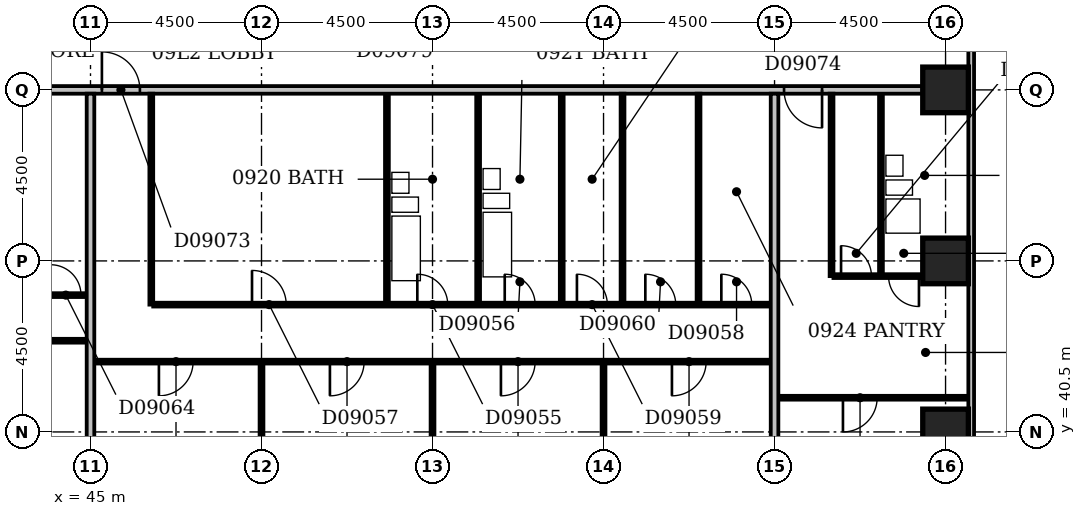
"""IFC4 building model, lengths in metres.
Left out: names, types, materials, properties, quantities, classifications, styles, units other than length and angle.
Written with IfcOpenShell. Run it as: python <this file> out.ifc"""

import sys

from ifc_helpers import new_model, si_unit, direction, frame, frame_2d, origin, origin_2d, place, context, subcontext, project, spatial, rectangle, extrude, element, fill, save


model = new_model("IFC4")
c1 = context("Model", 3, precision=1e-05, world=origin(), true_north=direction((0.0, 1.0)))
c2 = subcontext(c1, "Body", "Model", "MODEL_VIEW")
j1 = project(units=[si_unit("LENGTHUNIT", "METRE"), si_unit("PLANEANGLEUNIT", "RADIAN")], contexts=[c1])
p1 = place(None, origin())
s1 = spatial("IfcSite", under=j1, at=p1, CompositionType="ELEMENT")
p2 = place(p1, origin())
s2 = spatial("IfcBuilding", under=s1, at=p2, CompositionType="ELEMENT")
p3 = place(p2, frame((0.0, 0.0, 43.4)))
s3 = spatial("IfcBuildingStorey", under=s2, at=p3, CompositionType="ELEMENT", Elevation=43.4)
for number, where, z_axis, x_axis in (
    (1, (67.5, 40.5, -0.3), (0.0, 0.0, 1.0), (1.0, 0.0, 0.0)),
    (2, (67.5, 45.0, -0.3), (0.0, 0.0, 1.0), (1.0, 0.0, 0.0)),
    (3, (67.5, 49.5, -0.3), (0.0, 0.0, 1.0), (1.0, 0.0, 0.0)),
):
    element("IfcColumn", number, at=place(p3, frame(where, z_axis=z_axis, x_axis=x_axis)), inside=s3, PredefinedType="COLUMN", context=c2, shape_type="SweptSolid", body=[
        extrude(rectangle(XDim=1.2, YDim=1.2, at=origin_2d()), origin(), (0.0, 0.0, 1.0), 3.6),
    ])
p4 = place(p3, frame((68.175, 35.4, 0.0), z_axis=(0.0, 0.0, 1.0), x_axis=(0.0, 1.0, 0.0)))
e4 = element("IfcWall", 4, at=p4, inside=s3, PredefinedType="STANDARD", context=c2, shape_type="SweptSolid", body=[
    extrude(rectangle(XDim=23.85, YDim=0.15, at=frame_2d((11.925, 0.0))), origin(), (0.0, 0.0, 1.0), 2.7),
])
p5 = place(p4, frame((1.523, 0.0, 0.6)))
e5 = element("IfcOpeningElement", 5, at=p5, cuts=e4, PredefinedType="OPENING", context=c2, shape_type="SweptSolid", body=[
    extrude(rectangle(XDim=1.2, YDim=1.8, at=frame_2d((0.6, 0.9))), frame((0.0, 0.087, 0.0), z_axis=(0.0, -1.0, 0.0), x_axis=(1.0, 0.0, 0.0)), (0.0, 0.0, 1.0), 0.174),
])
p6 = place(p4, frame((19.5, 0.0, 0.6)))
e6 = element("IfcOpeningElement", 6, at=p6, cuts=e4, PredefinedType="OPENING", context=c2, shape_type="SweptSolid", body=[
    extrude(rectangle(XDim=0.6, YDim=1.8, at=frame_2d((0.3, 0.9))), frame((0.0, 0.087, 0.0), z_axis=(0.0, -1.0, 0.0), x_axis=(1.0, 0.0, 0.0)), (0.0, 0.0, 1.0), 0.174),
])
p7 = place(p4, frame((21.78, 0.0, 0.6)))
e7 = element("IfcOpeningElement", 7, at=p7, cuts=e4, PredefinedType="OPENING", context=c2, shape_type="SweptSolid", body=[
    extrude(rectangle(XDim=0.45, YDim=1.8, at=frame_2d((0.225, 0.9))), frame((0.0, 0.087, 0.0), z_axis=(0.0, -1.0, 0.0), x_axis=(1.0, 0.0, 0.0)), (0.0, 0.0, 1.0), 0.174),
])
p8 = place(p3, frame((45.0, 36.6, 0.0), z_axis=(0.0, 0.0, 1.0), x_axis=(0.0, 1.0, 0.0)))
e8 = element("IfcWall", 8, at=p8, inside=s3, PredefinedType="PARTITIONING", context=c2, shape_type="SweptSolid", body=[
    extrude(rectangle(XDim=12.8, YDim=0.2, at=frame_2d((6.4, 0.0))), origin(), (0.0, 0.0, 1.0), 2.6),
])
p9 = place(p3, frame((49.5, 36.6, 0.0), z_axis=(0.0, 0.0, 1.0), x_axis=(0.0, 1.0, 0.0)))
e9 = element("IfcWall", 9, at=p9, inside=s3, PredefinedType="PARTITIONING", context=c2, shape_type="SweptSolid", body=[
    extrude(rectangle(XDim=5.7, YDim=0.1, at=frame_2d((2.85, 0.0))), origin(), (0.0, 0.0, 1.0), 3.3),
])
p10 = place(p3, frame((54.0, 36.6, 0.0), z_axis=(0.0, 0.0, 1.0), x_axis=(0.0, 1.0, 0.0)))
e10 = element("IfcWall", 10, at=p10, inside=s3, PredefinedType="PARTITIONING", context=c2, shape_type="SweptSolid", body=[
    extrude(rectangle(XDim=5.7, YDim=0.1, at=frame_2d((2.85, 0.0))), origin(), (0.0, 0.0, 1.0), 2.6),
])
p11 = place(p3, frame((58.5, 36.6, 0.0), z_axis=(0.0, 0.0, 1.0), x_axis=(0.0, 1.0, 0.0)))
e11 = element("IfcWall", 11, at=p11, inside=s3, PredefinedType="PARTITIONING", context=c2, shape_type="SweptSolid", body=[
    extrude(rectangle(XDim=5.7, YDim=0.1, at=frame_2d((2.85, 0.0))), origin(), (0.0, 0.0, 1.0), 3.3),
])
p12 = place(p3, frame((63.0, 36.6, 0.0), z_axis=(0.0, 0.0, 1.0), x_axis=(0.0, 1.0, 0.0)))
e12 = element("IfcWall", 12, at=p12, inside=s3, PredefinedType="PARTITIONING", context=c2, shape_type="SweptSolid", body=[
    extrude(rectangle(XDim=12.8, YDim=0.2, at=frame_2d((6.4, 0.0))), origin(), (0.0, 0.0, 1.0), 2.4),
])
p13 = place(p3, frame((63.1, 41.4, 0.0), z_axis=(0.0, 0.0, 1.0), x_axis=(1.0, 0.0, 0.0)))
e13 = element("IfcWall", 13, at=p13, inside=s3, PredefinedType="PARTITIONING", context=c2, shape_type="SweptSolid", body=[
    extrude(rectangle(XDim=5.0, YDim=0.1, at=frame_2d((2.5, 0.0))), origin(), (0.0, 0.0, 1.0), 3.3),
])
p14 = place(p13, frame((1.7, 0.0, 0.0)))
e14 = element("IfcOpeningElement", 14, at=p14, cuts=e13, PredefinedType="OPENING", context=c2, shape_type="SweptSolid", body=[
    extrude(rectangle(XDim=0.9, YDim=2.1, at=frame_2d((0.45, 1.05))), frame((0.0, 0.062, 0.0), z_axis=(0.0, -1.0, 0.0), x_axis=(1.0, 0.0, 0.0)), (0.0, 0.0, 1.0), 0.124),
])
p15 = place(p3, frame((45.1, 42.35, 0.0), z_axis=(0.0, 0.0, 1.0), x_axis=(1.0, 0.0, 0.0)))
e15 = element("IfcWall", 15, at=p15, inside=s3, PredefinedType="PARTITIONING", context=c2, shape_type="SweptSolid", body=[
    extrude(rectangle(XDim=17.8, YDim=0.1, at=frame_2d((8.9, 0.0))), origin(), (0.0, 0.0, 1.0), 3.3),
])
p16 = place(p15, frame((1.7, 0.0, 0.0)))
e16 = element("IfcOpeningElement", 16, at=p16, cuts=e15, PredefinedType="OPENING", context=c2, shape_type="SweptSolid", body=[
    extrude(rectangle(XDim=0.9, YDim=2.1, at=frame_2d((0.45, 1.05))), frame((0.0, 0.062, 0.0), z_axis=(0.0, -1.0, 0.0), x_axis=(1.0, 0.0, 0.0)), (0.0, 0.0, 1.0), 0.124),
])
p17 = place(p15, frame((6.2, 0.0, 0.0)))
e17 = element("IfcOpeningElement", 17, at=p17, cuts=e15, PredefinedType="OPENING", context=c2, shape_type="SweptSolid", body=[
    extrude(rectangle(XDim=0.9, YDim=2.1, at=frame_2d((0.45, 1.05))), frame((0.0, 0.062, 0.0), z_axis=(0.0, -1.0, 0.0), x_axis=(1.0, 0.0, 0.0)), (0.0, 0.0, 1.0), 0.124),
])
p18 = place(p15, frame((10.7, 0.0, 0.0)))
e18 = element("IfcOpeningElement", 18, at=p18, cuts=e15, PredefinedType="OPENING", context=c2, shape_type="SweptSolid", body=[
    extrude(rectangle(XDim=0.9, YDim=2.1, at=frame_2d((0.45, 1.05))), frame((0.0, 0.062, 0.0), z_axis=(0.0, -1.0, 0.0), x_axis=(1.0, 0.0, 0.0)), (0.0, 0.0, 1.0), 0.124),
])
p19 = place(p15, frame((15.2, 0.0, 0.0)))
e19 = element("IfcOpeningElement", 19, at=p19, cuts=e15, PredefinedType="OPENING", context=c2, shape_type="SweptSolid", body=[
    extrude(rectangle(XDim=0.9, YDim=2.1, at=frame_2d((0.45, 1.05))), frame((0.0, 0.062, 0.0), z_axis=(0.0, -1.0, 0.0), x_axis=(1.0, 0.0, 0.0)), (0.0, 0.0, 1.0), 0.124),
])
p20 = place(p3, frame((40.6, 42.9, 0.0), z_axis=(0.0, 0.0, 1.0), x_axis=(1.0, 0.0, 0.0)))
e20 = element("IfcWall", 20, at=p20, inside=s3, PredefinedType="PARTITIONING", context=c2, shape_type="SweptSolid", body=[
    extrude(rectangle(XDim=4.3, YDim=0.1, at=frame_2d((2.15, 0.0))), origin(), (0.0, 0.0, 1.0), 3.3),
])
p21 = place(p20, frame((1.7, 0.0, 0.0)))
e21 = element("IfcOpeningElement", 21, at=p21, cuts=e20, PredefinedType="OPENING", context=c2, shape_type="SweptSolid", body=[
    extrude(rectangle(XDim=0.9, YDim=2.1, at=frame_2d((0.45, 1.05))), frame((0.0, 0.062, 0.0), z_axis=(0.0, -1.0, 0.0), x_axis=(1.0, 0.0, 0.0)), (0.0, 0.0, 1.0), 0.124),
])
p22 = place(p3, frame((46.6, 43.85, 0.0), z_axis=(0.0, 0.0, 1.0), x_axis=(0.0, 1.0, 0.0)))
e22 = element("IfcWall", 22, at=p22, inside=s3, PredefinedType="PARTITIONING", context=c2, shape_type="SweptSolid", body=[
    extrude(rectangle(XDim=5.55, YDim=0.1, at=frame_2d((2.775, 0.0))), origin(), (0.0, 0.0, 1.0), 3.3),
])
p23 = place(p3, frame((46.65, 43.85, 0.0), z_axis=(0.0, 0.0, 1.0), x_axis=(1.0, 0.0, 0.0)))
e23 = element("IfcWall", 23, at=p23, inside=s3, PredefinedType="PARTITIONING", context=c2, shape_type="SweptSolid", body=[
    extrude(rectangle(XDim=16.25, YDim=0.1, at=frame_2d((8.125, 0.0))), origin(), (0.0, 0.0, 1.0), 3.3),
])
p24 = place(p23, frame((6.95, 0.0, 0.0)))
e24 = element("IfcOpeningElement", 24, at=p24, cuts=e23, PredefinedType="OPENING", context=c2, shape_type="SweptSolid", body=[
    extrude(rectangle(XDim=0.8, YDim=2.1, at=frame_2d((0.4, 1.05))), frame((0.0, 0.062, 0.0), z_axis=(0.0, -1.0, 0.0), x_axis=(1.0, 0.0, 0.0)), (0.0, 0.0, 1.0), 0.124),
])
p25 = place(p23, frame((9.25, 0.0, 0.0)))
e25 = element("IfcOpeningElement", 25, at=p25, cuts=e23, PredefinedType="OPENING", context=c2, shape_type="SweptSolid", body=[
    extrude(rectangle(XDim=0.8, YDim=2.1, at=frame_2d((0.4, 1.05))), frame((0.0, 0.062, 0.0), z_axis=(0.0, -1.0, 0.0), x_axis=(1.0, 0.0, 0.0)), (0.0, 0.0, 1.0), 0.124),
])
p26 = place(p23, frame((2.6, 0.0, 0.0)))
e26 = element("IfcOpeningElement", 26, at=p26, cuts=e23, PredefinedType="OPENING", context=c2, shape_type="SweptSolid", body=[
    extrude(rectangle(XDim=0.9, YDim=2.1, at=frame_2d((0.45, 1.05))), frame((0.0, 0.062, 0.0), z_axis=(0.0, -1.0, 0.0), x_axis=(1.0, 0.0, 0.0)), (0.0, 0.0, 1.0), 0.124),
])
p27 = place(p23, frame((14.95, 0.0, 0.0)))
e27 = element("IfcOpeningElement", 27, at=p27, cuts=e23, PredefinedType="OPENING", context=c2, shape_type="SweptSolid", body=[
    extrude(rectangle(XDim=0.8, YDim=2.1, at=frame_2d((0.4, 1.05))), frame((0.0, 0.062, 0.0), z_axis=(0.0, -1.0, 0.0), x_axis=(1.0, 0.0, 0.0)), (0.0, 0.0, 1.0), 0.124),
])
p28 = place(p23, frame((11.15, 0.0, 0.0)))
e28 = element("IfcOpeningElement", 28, at=p28, cuts=e23, PredefinedType="OPENING", context=c2, shape_type="SweptSolid", body=[
    extrude(rectangle(XDim=0.8, YDim=2.1, at=frame_2d((0.4, 1.05))), frame((0.0, 0.062, 0.0), z_axis=(0.0, -1.0, 0.0), x_axis=(1.0, 0.0, 0.0)), (0.0, 0.0, 1.0), 0.124),
])
p29 = place(p23, frame((12.95, 0.0, 0.0)))
e29 = element("IfcOpeningElement", 29, at=p29, cuts=e23, PredefinedType="OPENING", context=c2, shape_type="SweptSolid", body=[
    extrude(rectangle(XDim=0.8, YDim=2.1, at=frame_2d((0.4, 1.05))), frame((0.0, 0.062, 0.0), z_axis=(0.0, -1.0, 0.0), x_axis=(1.0, 0.0, 0.0)), (0.0, 0.0, 1.0), 0.124),
])
for number, where, z_axis, x_axis in (
    (30, (52.8, 43.9, 0.0), (0.0, 0.0, 1.0), (0.0, 1.0, 0.0)),
    (31, (55.2, 43.9, 0.0), (0.0, 0.0, 1.0), (0.0, 1.0, 0.0)),
    (32, (57.4, 43.9, 0.0), (0.0, 0.0, 1.0), (0.0, 1.0, 0.0)),
):
    element("IfcWall", number, at=place(p3, frame(where, z_axis=z_axis, x_axis=x_axis)), inside=s3, PredefinedType="PLUMBINGWALL", context=c2, shape_type="SweptSolid", body=[
        extrude(rectangle(XDim=5.5, YDim=0.1, at=frame_2d((2.75, 0.0))), origin(), (0.0, 0.0, 1.0), 3.3),
    ])
for number, where, z_axis, x_axis in (
    (33, (59.0, 43.9, 0.0), (0.0, 0.0, 1.0), (0.0, 1.0, 0.0)),
    (34, (61.0, 43.9, 0.0), (0.0, 0.0, 1.0), (0.0, 1.0, 0.0)),
):
    element("IfcWall", number, at=place(p3, frame(where, z_axis=z_axis, x_axis=x_axis)), inside=s3, PredefinedType="PARTITIONING", context=c2, shape_type="SweptSolid", body=[
        extrude(rectangle(XDim=5.5, YDim=0.1, at=frame_2d((2.75, 0.0))), origin(), (0.0, 0.0, 1.0), 3.3),
    ])
p30 = place(p3, frame((43.75, 44.1, 0.0), z_axis=(0.0, 0.0, 1.0), x_axis=(1.0, 0.0, 0.0)))
e35 = element("IfcWall", 35, at=p30, inside=s3, PredefinedType="PARTITIONING", context=c2, shape_type="SweptSolid", body=[
    extrude(rectangle(XDim=1.15, YDim=0.1, at=frame_2d((0.575, 0.0))), origin(), (0.0, 0.0, 1.0), 3.3),
])
p31 = place(p30, frame((0.2, 0.0, 0.0)))
e36 = element("IfcOpeningElement", 36, at=p31, cuts=e35, PredefinedType="OPENING", context=c2, shape_type="SweptSolid", body=[
    extrude(rectangle(XDim=0.8, YDim=2.1, at=frame_2d((0.4, 1.05))), frame((0.0, 0.062, 0.0), z_axis=(0.0, -1.0, 0.0), x_axis=(1.0, 0.0, 0.0)), (0.0, 0.0, 1.0), 0.124),
])
p32 = place(p3, frame((64.5, 44.6, 0.0), z_axis=(0.0, 0.0, 1.0), x_axis=(0.0, 1.0, 0.0)))
e37 = element("IfcWall", 37, at=p32, inside=s3, PredefinedType="PARTITIONING", context=c2, shape_type="SweptSolid", body=[
    extrude(rectangle(XDim=4.8, YDim=0.1, at=frame_2d((2.4, 0.0))), origin(), (0.0, 0.0, 1.0), 3.3),
])
p33 = place(p3, frame((64.55, 44.6, 0.0), z_axis=(0.0, 0.0, 1.0), x_axis=(1.0, 0.0, 0.0)))
e38 = element("IfcWall", 38, at=p33, inside=s3, PredefinedType="PARTITIONING", context=c2, shape_type="SweptSolid", body=[
    extrude(rectangle(XDim=2.35, YDim=0.1, at=frame_2d((1.175, 0.0))), origin(), (0.0, 0.0, 1.0), 3.3),
])
p34 = place(p33, frame((1.45, 0.0, 0.0)))
e39 = element("IfcOpeningElement", 39, at=p34, cuts=e38, PredefinedType="OPENING", context=c2, shape_type="SweptSolid", body=[
    extrude(rectangle(XDim=0.8, YDim=2.1, at=frame_2d((0.4, 1.05))), frame((0.0, 0.062, 0.0), z_axis=(0.0, -1.0, 0.0), x_axis=(1.0, 0.0, 0.0)), (0.0, 0.0, 1.0), 0.124),
])
p35 = place(p33, frame((0.2, 0.0, 0.0)))
e40 = element("IfcOpeningElement", 40, at=p35, cuts=e38, PredefinedType="OPENING", context=c2, shape_type="SweptSolid", body=[
    extrude(rectangle(XDim=0.8, YDim=2.1, at=frame_2d((0.4, 1.05))), frame((0.0, 0.062, 0.0), z_axis=(0.0, -1.0, 0.0), x_axis=(1.0, 0.0, 0.0)), (0.0, 0.0, 1.0), 0.124),
])
p36 = place(p3, frame((65.8, 44.65, 0.0), z_axis=(0.0, 0.0, 1.0), x_axis=(0.0, 1.0, 0.0)))
e41 = element("IfcWall", 41, at=p36, inside=s3, PredefinedType="PLUMBINGWALL", context=c2, shape_type="SweptSolid", body=[
    extrude(rectangle(XDim=4.75, YDim=0.1, at=frame_2d((2.375, 0.0))), origin(), (0.0, 0.0, 1.0), 3.3),
])
p37 = place(p3, frame((9.1, 49.5, 0.0), z_axis=(0.0, 0.0, 1.0), x_axis=(1.0, 0.0, 0.0)))
e42 = element("IfcWall", 42, at=p37, inside=s3, PredefinedType="PARTITIONING", context=c2, shape_type="SweptSolid", body=[
    extrude(rectangle(XDim=57.8, YDim=0.2, at=frame_2d((28.9, 0.0))), origin(), (0.0, 0.0, 1.0), 3.3),
])
p38 = place(p37, frame((14.95, 0.0, 0.0)))
e43 = element("IfcOpeningElement", 43, at=p38, cuts=e42, PredefinedType="OPENING", context=c2, shape_type="SweptSolid", body=[
    extrude(rectangle(XDim=1.0, YDim=2.1, at=frame_2d((0.5, 1.05))), frame((0.0, 0.112, 0.0), z_axis=(0.0, -1.0, 0.0), x_axis=(1.0, 0.0, 0.0)), (0.0, 0.0, 1.0), 0.224),
])
p39 = place(p37, frame((19.85, 0.0, 0.0)))
e44 = element("IfcOpeningElement", 44, at=p39, cuts=e42, PredefinedType="OPENING", context=c2, shape_type="SweptSolid", body=[
    extrude(rectangle(XDim=1.0, YDim=2.1, at=frame_2d((0.5, 1.05))), frame((0.0, 0.112, 0.0), z_axis=(0.0, -1.0, 0.0), x_axis=(1.0, 0.0, 0.0)), (0.0, 0.0, 1.0), 0.224),
])
p40 = place(p37, frame((22.7, 0.0, 0.0)))
e45 = element("IfcOpeningElement", 45, at=p40, cuts=e42, PredefinedType="OPENING", context=c2, shape_type="SweptSolid", body=[
    extrude(rectangle(XDim=1.0, YDim=2.1, at=frame_2d((0.5, 1.05))), frame((0.0, 0.112, 0.0), z_axis=(0.0, -1.0, 0.0), x_axis=(1.0, 0.0, 0.0)), (0.0, 0.0, 1.0), 0.224),
])
p41 = place(p37, frame((33.35, 0.0, 0.0)))
e46 = element("IfcOpeningElement", 46, at=p41, cuts=e42, PredefinedType="OPENING", context=c2, shape_type="SweptSolid", body=[
    extrude(rectangle(XDim=1.0, YDim=2.1, at=frame_2d((0.5, 1.05))), frame((0.0, 0.112, 0.0), z_axis=(0.0, -1.0, 0.0), x_axis=(1.0, 0.0, 0.0)), (0.0, 0.0, 1.0), 0.224),
])
p42 = place(p37, frame((36.2, 0.0, 0.0)))
e47 = element("IfcOpeningElement", 47, at=p42, cuts=e42, PredefinedType="OPENING", context=c2, shape_type="SweptSolid", body=[
    extrude(rectangle(XDim=1.0, YDim=2.1, at=frame_2d((0.5, 1.05))), frame((0.0, 0.112, 0.0), z_axis=(0.0, -1.0, 0.0), x_axis=(1.0, 0.0, 0.0)), (0.0, 0.0, 1.0), 0.224),
])
p43 = place(p37, frame((54.15, 0.0, 0.0)))
e48 = element("IfcOpeningElement", 48, at=p43, cuts=e42, PredefinedType="OPENING", context=c2, shape_type="SweptSolid", body=[
    extrude(rectangle(XDim=1.0, YDim=2.1, at=frame_2d((0.5, 1.05))), frame((0.0, 0.112, 0.0), z_axis=(0.0, -1.0, 0.0), x_axis=(1.0, 0.0, 0.0)), (0.0, 0.0, 1.0), 0.224),
])
p44 = place(p37, frame((6.15, 0.0, 0.0)))
e49 = element("IfcOpeningElement", 49, at=p44, cuts=e42, PredefinedType="OPENING", context=c2, shape_type="SweptSolid", body=[
    extrude(rectangle(XDim=0.9, YDim=2.1, at=frame_2d((0.45, 1.05))), frame((0.0, 0.112, 0.0), z_axis=(0.0, -1.0, 0.0), x_axis=(1.0, 0.0, 0.0)), (0.0, 0.0, 1.0), 0.224),
])
p45 = place(p14, frame((0.9, 0.0, 0.0), z_axis=(0.0, 0.0, 1.0), x_axis=(-1.0, 0.0, 0.0)))
e50 = element("IfcDoor", 50, at=p45, inside=s3, OperationType="SINGLE_SWING_RIGHT", PredefinedType="DOOR", context=c2, shape_type="SweptSolid", body=[
    extrude(rectangle(XDim=0.9, YDim=2.1, at=frame_2d((0.45, 1.05))), frame((0.0, 0.025, 0.0), z_axis=(0.0, -1.0, 0.0), x_axis=(1.0, 0.0, 0.0)), (0.0, 0.0, 1.0), 0.05),
])
fill(e14, e50)
p46 = place(p16, frame((0.9, 0.0, 0.0), z_axis=(0.0, 0.0, 1.0), x_axis=(-1.0, 0.0, 0.0)))
e51 = element("IfcDoor", 51, at=p46, inside=s3, OperationType="SINGLE_SWING_RIGHT", PredefinedType="DOOR", context=c2, shape_type="SweptSolid", body=[
    extrude(rectangle(XDim=0.9, YDim=2.1, at=frame_2d((0.45, 1.05))), frame((0.0, 0.025, 0.0), z_axis=(0.0, -1.0, 0.0), x_axis=(1.0, 0.0, 0.0)), (0.0, 0.0, 1.0), 0.05),
])
fill(e16, e51)
p47 = place(p17, frame((0.9, 0.0, 0.0), z_axis=(0.0, 0.0, 1.0), x_axis=(-1.0, 0.0, 0.0)))
e52 = element("IfcDoor", 52, at=p47, inside=s3, OperationType="SINGLE_SWING_RIGHT", PredefinedType="DOOR", context=c2, shape_type="SweptSolid", body=[
    extrude(rectangle(XDim=0.9, YDim=2.1, at=frame_2d((0.45, 1.05))), frame((0.0, 0.025, 0.0), z_axis=(0.0, -1.0, 0.0), x_axis=(1.0, 0.0, 0.0)), (0.0, 0.0, 1.0), 0.05),
])
fill(e17, e52)
p48 = place(p18, frame((0.9, 0.0, 0.0), z_axis=(0.0, 0.0, 1.0), x_axis=(-1.0, 0.0, 0.0)))
e53 = element("IfcDoor", 53, at=p48, inside=s3, OperationType="SINGLE_SWING_RIGHT", PredefinedType="DOOR", context=c2, shape_type="SweptSolid", body=[
    extrude(rectangle(XDim=0.9, YDim=2.1, at=frame_2d((0.45, 1.05))), frame((0.0, 0.025, 0.0), z_axis=(0.0, -1.0, 0.0), x_axis=(1.0, 0.0, 0.0)), (0.0, 0.0, 1.0), 0.05),
])
fill(e18, e53)
p49 = place(p19, frame((0.9, 0.0, 0.0), z_axis=(0.0, 0.0, 1.0), x_axis=(-1.0, 0.0, 0.0)))
e54 = element("IfcDoor", 54, at=p49, inside=s3, OperationType="SINGLE_SWING_RIGHT", PredefinedType="DOOR", context=c2, shape_type="SweptSolid", body=[
    extrude(rectangle(XDim=0.9, YDim=2.1, at=frame_2d((0.45, 1.05))), frame((0.0, 0.025, 0.0), z_axis=(0.0, -1.0, 0.0), x_axis=(1.0, 0.0, 0.0)), (0.0, 0.0, 1.0), 0.05),
])
fill(e19, e54)
p50 = place(p24, origin())
e55 = element("IfcDoor", 55, at=p50, inside=s3, OperationType="SINGLE_SWING_LEFT", PredefinedType="DOOR", context=c2, shape_type="SweptSolid", body=[
    extrude(rectangle(XDim=0.8, YDim=2.1, at=frame_2d((0.4, 1.05))), frame((0.0, 0.025, 0.0), z_axis=(0.0, -1.0, 0.0), x_axis=(1.0, 0.0, 0.0)), (0.0, 0.0, 1.0), 0.05),
])
fill(e24, e55)
p51 = place(p25, origin())
e56 = element("IfcDoor", 56, at=p51, inside=s3, OperationType="SINGLE_SWING_LEFT", PredefinedType="DOOR", context=c2, shape_type="SweptSolid", body=[
    extrude(rectangle(XDim=0.8, YDim=2.1, at=frame_2d((0.4, 1.05))), frame((0.0, 0.025, 0.0), z_axis=(0.0, -1.0, 0.0), x_axis=(1.0, 0.0, 0.0)), (0.0, 0.0, 1.0), 0.05),
])
fill(e25, e56)
p52 = place(p26, origin())
e57 = element("IfcDoor", 57, at=p52, inside=s3, OperationType="SINGLE_SWING_LEFT", PredefinedType="DOOR", context=c2, shape_type="SweptSolid", body=[
    extrude(rectangle(XDim=0.9, YDim=2.1, at=frame_2d((0.45, 1.05))), frame((0.0, 0.025, 0.0), z_axis=(0.0, -1.0, 0.0), x_axis=(1.0, 0.0, 0.0)), (0.0, 0.0, 1.0), 0.05),
])
fill(e26, e57)
p53 = place(p27, origin())
e58 = element("IfcDoor", 58, at=p53, inside=s3, OperationType="SINGLE_SWING_LEFT", PredefinedType="DOOR", context=c2, shape_type="SweptSolid", body=[
    extrude(rectangle(XDim=0.8, YDim=2.1, at=frame_2d((0.4, 1.05))), frame((0.0, 0.025, 0.0), z_axis=(0.0, -1.0, 0.0), x_axis=(1.0, 0.0, 0.0)), (0.0, 0.0, 1.0), 0.05),
])
fill(e27, e58)
p54 = place(p28, origin())
e59 = element("IfcDoor", 59, at=p54, inside=s3, OperationType="SINGLE_SWING_LEFT", PredefinedType="DOOR", context=c2, shape_type="SweptSolid", body=[
    extrude(rectangle(XDim=0.8, YDim=2.1, at=frame_2d((0.4, 1.05))), frame((0.0, 0.025, 0.0), z_axis=(0.0, -1.0, 0.0), x_axis=(1.0, 0.0, 0.0)), (0.0, 0.0, 1.0), 0.05),
])
fill(e28, e59)
p55 = place(p29, origin())
e60 = element("IfcDoor", 60, at=p55, inside=s3, OperationType="SINGLE_SWING_LEFT", PredefinedType="DOOR", context=c2, shape_type="SweptSolid", body=[
    extrude(rectangle(XDim=0.8, YDim=2.1, at=frame_2d((0.4, 1.05))), frame((0.0, 0.025, 0.0), z_axis=(0.0, -1.0, 0.0), x_axis=(1.0, 0.0, 0.0)), (0.0, 0.0, 1.0), 0.05),
])
fill(e29, e60)
p56 = place(p31, origin())
e61 = element("IfcDoor", 61, at=p56, inside=s3, OperationType="SINGLE_SWING_LEFT", PredefinedType="DOOR", context=c2, shape_type="SweptSolid", body=[
    extrude(rectangle(XDim=0.8, YDim=2.1, at=frame_2d((0.4, 1.05))), frame((0.0, 0.025, 0.0), z_axis=(0.0, -1.0, 0.0), x_axis=(1.0, 0.0, 0.0)), (0.0, 0.0, 1.0), 0.05),
])
fill(e36, e61)
p57 = place(p34, origin())
e62 = element("IfcDoor", 62, at=p57, inside=s3, OperationType="SINGLE_SWING_RIGHT", PredefinedType="DOOR", context=c2, shape_type="SweptSolid", body=[
    extrude(rectangle(XDim=0.8, YDim=2.1, at=frame_2d((0.4, 1.05))), frame((0.0, 0.025, 0.0), z_axis=(0.0, -1.0, 0.0), x_axis=(1.0, 0.0, 0.0)), (0.0, 0.0, 1.0), 0.05),
])
fill(e39, e62)
p58 = place(p35, origin())
e63 = element("IfcDoor", 63, at=p58, inside=s3, OperationType="SINGLE_SWING_LEFT", PredefinedType="DOOR", context=c2, shape_type="SweptSolid", body=[
    extrude(rectangle(XDim=0.8, YDim=2.1, at=frame_2d((0.4, 1.05))), frame((0.0, 0.025, 0.0), z_axis=(0.0, -1.0, 0.0), x_axis=(1.0, 0.0, 0.0)), (0.0, 0.0, 1.0), 0.05),
])
fill(e40, e63)
p59 = place(p42, origin())
e64 = element("IfcDoor", 64, at=p59, inside=s3, OperationType="SINGLE_SWING_LEFT", PredefinedType="DOOR", context=c2, shape_type="SweptSolid", body=[
    extrude(rectangle(XDim=1.0, YDim=2.1, at=frame_2d((0.5, 1.05))), frame((0.0, 0.025, 0.0), z_axis=(0.0, -1.0, 0.0), x_axis=(1.0, 0.0, 0.0)), (0.0, 0.0, 1.0), 0.05),
])
fill(e47, e64)
p60 = place(p43, origin())
e65 = element("IfcDoor", 65, at=p60, inside=s3, OperationType="SINGLE_SWING_RIGHT", PredefinedType="DOOR", context=c2, shape_type="SweptSolid", body=[
    extrude(rectangle(XDim=1.0, YDim=2.1, at=frame_2d((0.5, 1.05))), frame((0.0, 0.025, 0.0), z_axis=(0.0, -1.0, 0.0), x_axis=(1.0, 0.0, 0.0)), (0.0, 0.0, 1.0), 0.05),
])
fill(e48, e65)
save(model, sys.argv[1])
